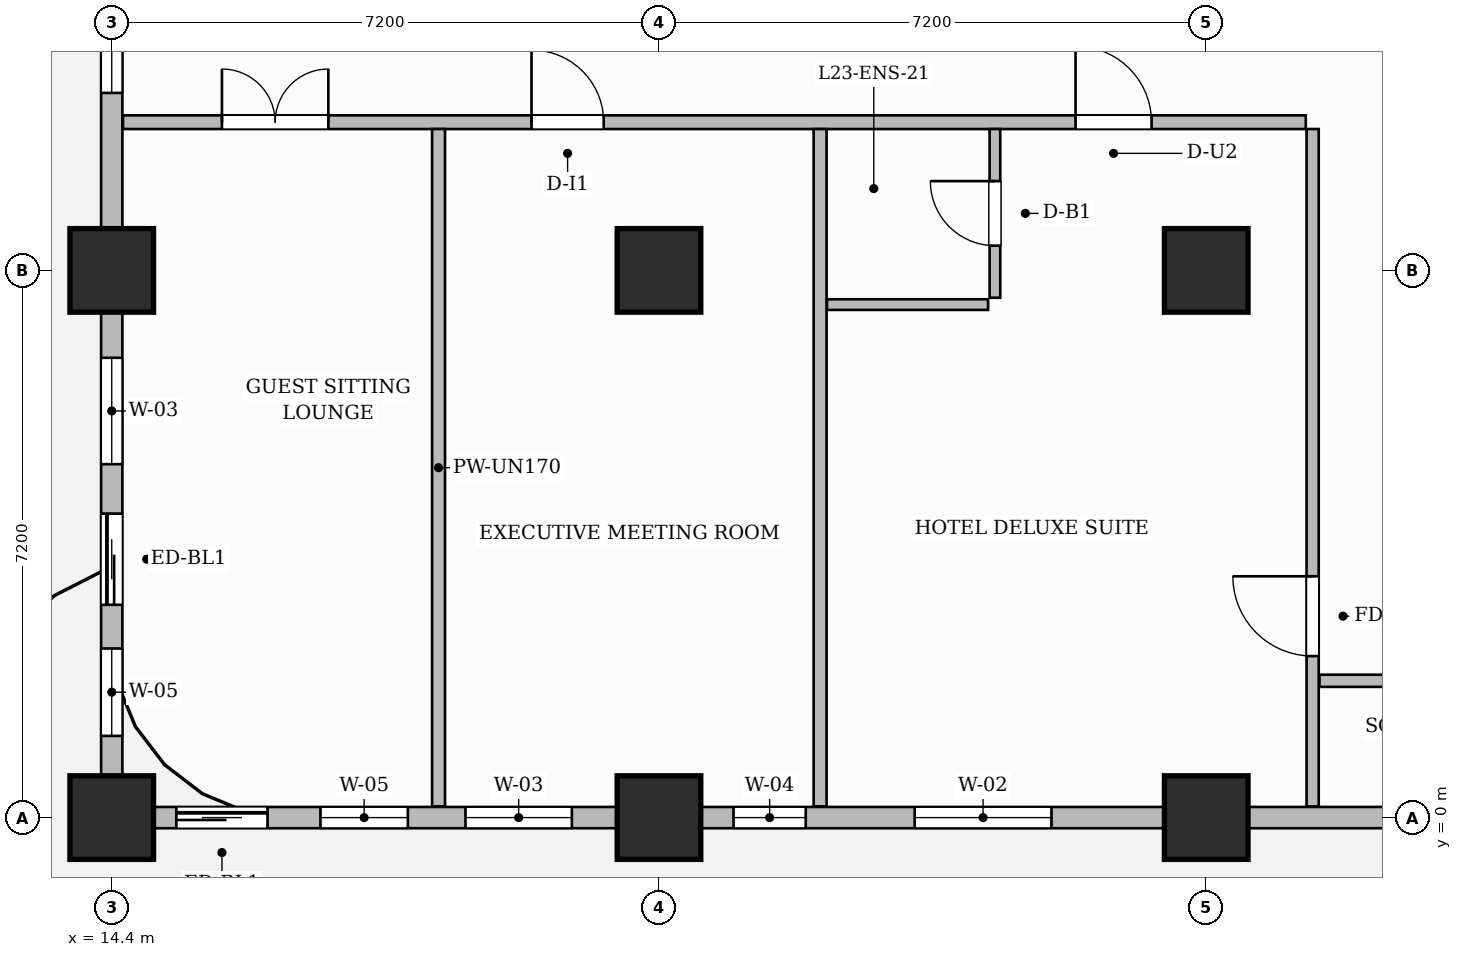
"""IFC4 building model, lengths in metres.
Left out: names, types, materials, properties, quantities, classifications, styles, units other than length and angle.
Written with IfcOpenShell. Run it as: python <this file> out.ifc"""

import sys

from ifc_helpers import new_model, si_unit, direction, frame, frame_2d, origin, origin_2d, place, context, subcontext, project, spatial, rectangle, extrude, source, transform, mapped, element, fill, save


model = new_model("IFC4")
c1 = context("Model", 3, precision=1e-05, world=origin(), true_north=direction((0.0, 1.0)))
c2 = subcontext(c1, "Body", "Model", "MODEL_VIEW")
j1 = project(units=[si_unit("LENGTHUNIT", "METRE"), si_unit("PLANEANGLEUNIT", "RADIAN")], contexts=[c1])
p1 = place(None, origin())
s1 = spatial("IfcSite", under=j1, at=p1, CompositionType="ELEMENT")
p2 = place(p1, origin())
s2 = spatial("IfcBuilding", under=s1, at=p2, CompositionType="ELEMENT")
p3 = place(p2, frame((0.0, 0.0, 95.3)))
s3 = spatial("IfcBuildingStorey", under=s2, at=p3, CompositionType="ELEMENT", Elevation=95.3)
m1 = source(origin(), c2, "Body", "SweptSolid", [
    extrude(rectangle(XDim=1.1, YDim=1.1, at=origin_2d()), origin(), (0.0, 0.0, 1.0), 3.7),
])
for number, where, z_axis, x_axis in (
    (1, (14.4, 0.0, 0.0), (0.0, 0.0, 1.0), (1.0, 0.0, 0.0)),
    (2, (14.4, 7.2, 0.0), (0.0, 0.0, 1.0), (1.0, 0.0, 0.0)),
    (3, (21.6, 0.0, 0.0), (0.0, 0.0, 1.0), (1.0, 0.0, 0.0)),
    (4, (21.6, 7.2, 0.0), (0.0, 0.0, 1.0), (1.0, 0.0, 0.0)),
    (5, (28.8, 0.0, 0.0), (0.0, 0.0, 1.0), (1.0, 0.0, 0.0)),
    (6, (28.8, 7.2, 0.0), (0.0, 0.0, 1.0), (1.0, 0.0, 0.0)),
):
    element("IfcColumn", number, at=place(p3, frame(where, z_axis=z_axis, x_axis=x_axis)), inside=s3, PredefinedType="COLUMN", context=c2, shape_type="MappedRepresentation", body=[
        mapped(m1, transform((0.0, 0.0, 0.0), scale=1.0)),
    ])
p4 = place(p3, frame((14.548, 9.15, 0.0), z_axis=(0.0, 0.0, 1.0), x_axis=(1.0, 0.0, 0.0)))
e7 = element("IfcWall", 7, at=p4, inside=s3, PredefinedType="PARTITIONING", context=c2, shape_type="SweptSolid", body=[
    extrude(rectangle(XDim=15.562, YDim=0.18, at=frame_2d((7.781, 0.0))), origin(), (0.0, 0.0, 1.0), 3.45),
])
p5 = place(p4, frame((1.302, 0.0, 0.0)))
e8 = element("IfcOpeningElement", 8, at=p5, cuts=e7, PredefinedType="OPENING", context=c2, shape_type="SweptSolid", body=[
    extrude(rectangle(XDim=1.4, YDim=2.35, at=frame_2d((0.7, 1.175))), frame((0.0, 0.1, 0.0), z_axis=(0.0, -1.0, 0.0), x_axis=(1.0, 0.0, 0.0)), (0.0, 0.0, 1.0), 0.2),
])
p6 = place(p4, frame((5.375, 0.0, 0.0)))
e9 = element("IfcOpeningElement", 9, at=p6, cuts=e7, PredefinedType="OPENING", context=c2, shape_type="SweptSolid", body=[
    extrude(rectangle(XDim=0.95, YDim=2.15, at=frame_2d((0.475, 1.075))), frame((0.0, 0.1, 0.0), z_axis=(0.0, -1.0, 0.0), x_axis=(1.0, 0.0, 0.0)), (0.0, 0.0, 1.0), 0.2),
])
p7 = place(p4, frame((12.533, 0.0, 0.0)))
e10 = element("IfcOpeningElement", 10, at=p7, cuts=e7, PredefinedType="OPENING", context=c2, shape_type="SweptSolid", body=[
    extrude(rectangle(XDim=1.0, YDim=2.2, at=frame_2d((0.5, 1.1))), frame((0.0, 0.1, 0.0), z_axis=(0.0, -1.0, 0.0), x_axis=(1.0, 0.0, 0.0)), (0.0, 0.0, 1.0), 0.2),
])
p8 = place(p3, frame((30.2, 0.148, 0.0), z_axis=(0.0, 0.0, 1.0), x_axis=(0.0, 1.0, 0.0)))
e11 = element("IfcWall", 11, at=p8, inside=s3, PredefinedType="PARTITIONING", context=c2, shape_type="SweptSolid", body=[
    extrude(rectangle(XDim=8.912, YDim=0.16, at=frame_2d((4.456, 0.0))), origin(), (0.0, 0.0, 1.0), 3.45),
])
p9 = place(p8, frame((1.977, 0.0, 0.0)))
e12 = element("IfcOpeningElement", 12, at=p9, cuts=e11, PredefinedType="OPENING", context=c2, shape_type="SweptSolid", body=[
    extrude(rectangle(XDim=1.05, YDim=2.15, at=frame_2d((0.525, 1.075))), frame((0.0, 0.09, 0.0), z_axis=(0.0, -1.0, 0.0), x_axis=(1.0, 0.0, 0.0)), (0.0, 0.0, 1.0), 0.18),
])
p10 = place(p3, frame((30.29, 1.8, 0.0), z_axis=(0.0, 0.0, 1.0), x_axis=(1.0, 0.0, 0.0)))
e13 = element("IfcWall", 13, at=p10, inside=s3, PredefinedType="PARTITIONING", context=c2, shape_type="SweptSolid", body=[
    extrude(rectangle(XDim=19.37, YDim=0.16, at=frame_2d((9.685, 0.0))), origin(), (0.0, 0.0, 1.0), 3.45),
])
p11 = place(p10, frame((5.213, 0.0, 0.0)))
e14 = element("IfcOpeningElement", 14, at=p11, cuts=e13, PredefinedType="OPENING", context=c2, shape_type="SweptSolid", body=[
    extrude(rectangle(XDim=0.9, YDim=2.15, at=frame_2d((0.45, 1.075))), frame((0.0, 0.09, 0.0), z_axis=(0.0, -1.0, 0.0), x_axis=(1.0, 0.0, 0.0)), (0.0, 0.0, 1.0), 0.18),
])
p12 = place(p10, frame((14.06, 0.0, 0.0)))
e15 = element("IfcOpeningElement", 15, at=p12, cuts=e13, PredefinedType="OPENING", context=c2, shape_type="SweptSolid", body=[
    extrude(rectangle(XDim=0.9, YDim=2.15, at=frame_2d((0.45, 1.075))), frame((0.0, 0.09, 0.0), z_axis=(0.0, -1.0, 0.0), x_axis=(1.0, 0.0, 0.0)), (0.0, 0.0, 1.0), 0.18),
])
for number, where, z_axis, x_axis in (
    (16, (18.7, 0.148, 0.0), (0.0, 0.0, 1.0), (0.0, 1.0, 0.0)),
    (17, (23.72, 0.148, 0.0), (0.0, 0.0, 1.0), (0.0, 1.0, 0.0)),
):
    element("IfcWall", number, at=place(p3, frame(where, z_axis=z_axis, x_axis=x_axis)), inside=s3, PredefinedType="PARTITIONING", context=c2, shape_type="SweptSolid", body=[
        extrude(rectangle(XDim=8.912, YDim=0.17, at=frame_2d((4.456, 0.0))), origin(), (0.0, 0.0, 1.0), 3.45),
    ])
p13 = place(p3, frame((26.02, 6.84, 0.0), z_axis=(0.0, 0.0, 1.0), x_axis=(0.0, 1.0, 0.0)))
e18 = element("IfcWall", 18, at=p13, inside=s3, PredefinedType="PARTITIONING", context=c2, shape_type="SweptSolid", body=[
    extrude(rectangle(XDim=2.22, YDim=0.14, at=frame_2d((1.11, 0.0))), origin(), (0.0, 0.0, 1.0), 3.45),
])
p14 = place(p13, frame((0.685, 0.0, 0.0)))
e19 = element("IfcOpeningElement", 19, at=p14, cuts=e18, PredefinedType="OPENING", context=c2, shape_type="SweptSolid", body=[
    extrude(rectangle(XDim=0.85, YDim=2.1, at=frame_2d((0.425, 1.05))), frame((0.0, 0.08, 0.0), z_axis=(0.0, -1.0, 0.0), x_axis=(1.0, 0.0, 0.0)), (0.0, 0.0, 1.0), 0.16),
])
p15 = place(p3, frame((23.81, 6.75, 0.0), z_axis=(0.0, 0.0, 1.0), x_axis=(1.0, 0.0, 0.0)))
e20 = element("IfcWall", 20, at=p15, inside=s3, PredefinedType="PARTITIONING", context=c2, shape_type="SweptSolid", body=[
    extrude(rectangle(XDim=2.12, YDim=0.14, at=frame_2d((1.06, 0.0))), origin(), (0.0, 0.0, 1.0), 3.45),
])
p16 = place(p3, frame((14.4, 0.0, 0.0), z_axis=(0.0, 0.0, 1.0), x_axis=(1.0, 0.0, 0.0)))
e21 = element("IfcWall", 21, at=p16, inside=s3, PredefinedType="SOLIDWALL", context=c2, shape_type="SweptSolid", body=[
    extrude(rectangle(XDim=43.2, YDim=0.28, at=frame_2d((21.6, 0.0))), origin(), (0.0, 0.0, 1.0), 2.885),
])
p17 = place(p16, frame((0.85, 0.0, 0.0)))
e22 = element("IfcOpeningElement", 22, at=p17, cuts=e21, PredefinedType="OPENING", context=c2, shape_type="SweptSolid", body=[
    extrude(rectangle(XDim=1.2, YDim=2.2, at=frame_2d((0.6, 1.1))), frame((0.0, 0.15, 0.0), z_axis=(0.0, -1.0, 0.0), x_axis=(1.0, 0.0, 0.0)), (0.0, 0.0, 1.0), 0.3),
])
p18 = place(p16, frame((2.746, 0.0, 0.8)))
e23 = element("IfcOpeningElement", 23, at=p18, cuts=e21, PredefinedType="OPENING", context=c2, shape_type="SweptSolid", body=[
    extrude(rectangle(XDim=1.15, YDim=1.8, at=frame_2d((0.575, 0.9))), frame((0.0, 0.15, 0.0), z_axis=(0.0, -1.0, 0.0), x_axis=(1.0, 0.0, 0.0)), (0.0, 0.0, 1.0), 0.3),
])
p19 = place(p16, frame((4.654, 0.0, 0.8)))
e24 = element("IfcOpeningElement", 24, at=p19, cuts=e21, PredefinedType="OPENING", context=c2, shape_type="SweptSolid", body=[
    extrude(rectangle(XDim=1.4, YDim=1.85, at=frame_2d((0.7, 0.925))), frame((0.0, 0.15, 0.0), z_axis=(0.0, -1.0, 0.0), x_axis=(1.0, 0.0, 0.0)), (0.0, 0.0, 1.0), 0.3),
])
p20 = place(p16, frame((8.181, 0.0, 0.8)))
e25 = element("IfcOpeningElement", 25, at=p20, cuts=e21, PredefinedType="OPENING", context=c2, shape_type="SweptSolid", body=[
    extrude(rectangle(XDim=0.95, YDim=1.75, at=frame_2d((0.475, 0.875))), frame((0.0, 0.15, 0.0), z_axis=(0.0, -1.0, 0.0), x_axis=(1.0, 0.0, 0.0)), (0.0, 0.0, 1.0), 0.3),
])
p21 = place(p16, frame((10.564, 0.0, 0.8)))
e26 = element("IfcOpeningElement", 26, at=p21, cuts=e21, PredefinedType="OPENING", context=c2, shape_type="SweptSolid", body=[
    extrude(rectangle(XDim=1.8, YDim=1.85, at=frame_2d((0.9, 0.925))), frame((0.0, 0.15, 0.0), z_axis=(0.0, -1.0, 0.0), x_axis=(1.0, 0.0, 0.0)), (0.0, 0.0, 1.0), 0.3),
])
p22 = place(p16, frame((16.804, 0.0, 0.8)))
e27 = element("IfcOpeningElement", 27, at=p22, cuts=e21, PredefinedType="OPENING", context=c2, shape_type="SweptSolid", body=[
    extrude(rectangle(XDim=1.8, YDim=1.85, at=frame_2d((0.9, 0.925))), frame((0.0, 0.15, 0.0), z_axis=(0.0, -1.0, 0.0), x_axis=(1.0, 0.0, 0.0)), (0.0, 0.0, 1.0), 0.3),
])
p23 = place(p16, frame((22.396, 0.0, 0.8)))
e28 = element("IfcOpeningElement", 28, at=p23, cuts=e21, PredefinedType="OPENING", context=c2, shape_type="SweptSolid", body=[
    extrude(rectangle(XDim=1.8, YDim=1.85, at=frame_2d((0.9, 0.925))), frame((0.0, 0.15, 0.0), z_axis=(0.0, -1.0, 0.0), x_axis=(1.0, 0.0, 0.0)), (0.0, 0.0, 1.0), 0.3),
])
p24 = place(p16, frame((25.629, 0.0, 0.8)))
e29 = element("IfcOpeningElement", 29, at=p24, cuts=e21, PredefinedType="OPENING", context=c2, shape_type="SweptSolid", body=[
    extrude(rectangle(XDim=0.95, YDim=1.75, at=frame_2d((0.475, 0.875))), frame((0.0, 0.15, 0.0), z_axis=(0.0, -1.0, 0.0), x_axis=(1.0, 0.0, 0.0)), (0.0, 0.0, 1.0), 0.3),
])
p25 = place(p16, frame((29.075, 0.0, 0.8)))
e30 = element("IfcOpeningElement", 30, at=p25, cuts=e21, PredefinedType="OPENING", context=c2, shape_type="SweptSolid", body=[
    extrude(rectangle(XDim=1.8, YDim=1.85, at=frame_2d((0.9, 0.925))), frame((0.0, 0.15, 0.0), z_axis=(0.0, -1.0, 0.0), x_axis=(1.0, 0.0, 0.0)), (0.0, 0.0, 1.0), 0.3),
])
p26 = place(p16, frame((32.125, 0.0, 0.8)))
e31 = element("IfcOpeningElement", 31, at=p26, cuts=e21, PredefinedType="OPENING", context=c2, shape_type="SweptSolid", body=[
    extrude(rectangle(XDim=1.8, YDim=1.85, at=frame_2d((0.9, 0.925))), frame((0.0, 0.15, 0.0), z_axis=(0.0, -1.0, 0.0), x_axis=(1.0, 0.0, 0.0)), (0.0, 0.0, 1.0), 0.3),
])
p27 = place(p16, frame((36.946, 0.0, 0.8)))
e32 = element("IfcOpeningElement", 32, at=p27, cuts=e21, PredefinedType="OPENING", context=c2, shape_type="SweptSolid", body=[
    extrude(rectangle(XDim=1.8, YDim=1.85, at=frame_2d((0.9, 0.925))), frame((0.0, 0.15, 0.0), z_axis=(0.0, -1.0, 0.0), x_axis=(1.0, 0.0, 0.0)), (0.0, 0.0, 1.0), 0.3),
])
p28 = place(p16, frame((40.054, 0.0, 0.8)))
e33 = element("IfcOpeningElement", 33, at=p28, cuts=e21, PredefinedType="OPENING", context=c2, shape_type="SweptSolid", body=[
    extrude(rectangle(XDim=1.8, YDim=1.85, at=frame_2d((0.9, 0.925))), frame((0.0, 0.15, 0.0), z_axis=(0.0, -1.0, 0.0), x_axis=(1.0, 0.0, 0.0)), (0.0, 0.0, 1.0), 0.3),
])
p29 = place(p3, frame((14.4, 0.05, 0.0), z_axis=(0.0, 0.0, 1.0), x_axis=(0.0, 1.0, 0.0)))
e34 = element("IfcWall", 34, at=p29, inside=s3, PredefinedType="SOLIDWALL", context=c2, shape_type="SweptSolid", body=[
    extrude(rectangle(XDim=20.6, YDim=0.28, at=frame_2d((10.3, 0.0))), origin(), (0.0, 0.0, 1.0), 2.885),
])
p30 = place(p29, frame((2.75, 0.0, 0.0)))
e35 = element("IfcOpeningElement", 35, at=p30, cuts=e34, PredefinedType="OPENING", context=c2, shape_type="SweptSolid", body=[
    extrude(rectangle(XDim=1.2, YDim=2.2, at=frame_2d((0.6, 1.1))), frame((0.0, 0.15, 0.0), z_axis=(0.0, -1.0, 0.0), x_axis=(1.0, 0.0, 0.0)), (0.0, 0.0, 1.0), 0.3),
])
p31 = place(p29, frame((1.025, 0.0, 0.8)))
e36 = element("IfcOpeningElement", 36, at=p31, cuts=e34, PredefinedType="OPENING", context=c2, shape_type="SweptSolid", body=[
    extrude(rectangle(XDim=1.15, YDim=1.8, at=frame_2d((0.575, 0.9))), frame((0.0, 0.15, 0.0), z_axis=(0.0, -1.0, 0.0), x_axis=(1.0, 0.0, 0.0)), (0.0, 0.0, 1.0), 0.3),
])
p32 = place(p29, frame((4.6, 0.0, 0.8)))
e37 = element("IfcOpeningElement", 37, at=p32, cuts=e34, PredefinedType="OPENING", context=c2, shape_type="SweptSolid", body=[
    extrude(rectangle(XDim=1.4, YDim=1.85, at=frame_2d((0.7, 0.925))), frame((0.0, 0.15, 0.0), z_axis=(0.0, -1.0, 0.0), x_axis=(1.0, 0.0, 0.0)), (0.0, 0.0, 1.0), 0.3),
])
p33 = place(p29, frame((9.485, 0.0, 0.8)))
e38 = element("IfcOpeningElement", 38, at=p33, cuts=e34, PredefinedType="OPENING", context=c2, shape_type="SweptSolid", body=[
    extrude(rectangle(XDim=1.15, YDim=1.8, at=frame_2d((0.575, 0.9))), frame((0.0, 0.15, 0.0), z_axis=(0.0, -1.0, 0.0), x_axis=(1.0, 0.0, 0.0)), (0.0, 0.0, 1.0), 0.3),
])
p34 = place(p29, frame((11.389, 0.0, 0.8)))
e39 = element("IfcOpeningElement", 39, at=p34, cuts=e34, PredefinedType="OPENING", context=c2, shape_type="SweptSolid", body=[
    extrude(rectangle(XDim=1.8, YDim=1.85, at=frame_2d((0.9, 0.925))), frame((0.0, 0.15, 0.0), z_axis=(0.0, -1.0, 0.0), x_axis=(1.0, 0.0, 0.0)), (0.0, 0.0, 1.0), 0.3),
])
p35 = place(p29, frame((16.79, 0.0, 0.8)))
e40 = element("IfcOpeningElement", 40, at=p35, cuts=e34, PredefinedType="OPENING", context=c2, shape_type="SweptSolid", body=[
    extrude(rectangle(XDim=1.8, YDim=1.85, at=frame_2d((0.9, 0.925))), frame((0.0, 0.15, 0.0), z_axis=(0.0, -1.0, 0.0), x_axis=(1.0, 0.0, 0.0)), (0.0, 0.0, 1.0), 0.3),
])
m2 = source(origin(), c2, "Body", "SweptSolid", [
    extrude(rectangle(XDim=1.05, YDim=2.15, at=frame_2d((0.525, 1.075))), frame((0.0, 0.025, 0.0), z_axis=(0.0, -1.0, 0.0), x_axis=(1.0, 0.0, 0.0)), (0.0, 0.0, 1.0), 0.05),
])
p36 = place(p9, origin())
e41 = element("IfcDoor", 41, at=p36, inside=s3, OperationType="SINGLE_SWING_RIGHT", PredefinedType="DOOR", context=c2, shape_type="MappedRepresentation", body=[
    mapped(m2, transform((0.0, 0.0, 0.0), scale=1.0)),
])
fill(e12, e41)
m3 = source(origin(), c2, "Body", "SweptSolid", [
    extrude(rectangle(XDim=1.4, YDim=2.35, at=frame_2d((0.7, 1.175))), frame((0.0, 0.025, 0.0), z_axis=(0.0, -1.0, 0.0), x_axis=(1.0, 0.0, 0.0)), (0.0, 0.0, 1.0), 0.05),
])
p37 = place(p5, origin())
e42 = element("IfcDoor", 42, at=p37, inside=s3, OperationType="DOUBLE_DOOR_SINGLE_SWING", PredefinedType="DOOR", context=c2, shape_type="MappedRepresentation", body=[
    mapped(m3, transform((0.0, 0.0, 0.0), scale=1.0)),
])
fill(e8, e42)
m4 = source(origin(), c2, "Body", "SweptSolid", [
    extrude(rectangle(XDim=0.95, YDim=2.15, at=frame_2d((0.475, 1.075))), frame((0.0, 0.025, 0.0), z_axis=(0.0, -1.0, 0.0), x_axis=(1.0, 0.0, 0.0)), (0.0, 0.0, 1.0), 0.05),
])
p38 = place(p6, origin())
e43 = element("IfcDoor", 43, at=p38, inside=s3, OperationType="SINGLE_SWING_LEFT", PredefinedType="DOOR", context=c2, shape_type="MappedRepresentation", body=[
    mapped(m4, transform((0.0, 0.0, 0.0), scale=1.0)),
])
fill(e9, e43)
m5 = source(origin(), c2, "Body", "SweptSolid", [
    extrude(rectangle(XDim=0.85, YDim=2.1, at=frame_2d((0.425, 1.05))), frame((0.0, 0.025, 0.0), z_axis=(0.0, -1.0, 0.0), x_axis=(1.0, 0.0, 0.0)), (0.0, 0.0, 1.0), 0.05),
])
p39 = place(p14, origin())
e44 = element("IfcDoor", 44, at=p39, inside=s3, OperationType="SINGLE_SWING_RIGHT", PredefinedType="DOOR", context=c2, shape_type="MappedRepresentation", body=[
    mapped(m5, transform((0.0, 0.0, 0.0), scale=1.0)),
])
fill(e19, e44)
m6 = source(origin(), c2, "Body", "SweptSolid", [
    extrude(rectangle(XDim=1.0, YDim=2.2, at=frame_2d((0.5, 1.1))), frame((0.0, 0.025, 0.0), z_axis=(0.0, -1.0, 0.0), x_axis=(1.0, 0.0, 0.0)), (0.0, 0.0, 1.0), 0.05),
])
p40 = place(p7, origin())
e45 = element("IfcDoor", 45, at=p40, inside=s3, OperationType="SINGLE_SWING_LEFT", PredefinedType="DOOR", context=c2, shape_type="MappedRepresentation", body=[
    mapped(m6, transform((0.0, 0.0, 0.0), scale=1.0)),
])
fill(e10, e45)
m7 = source(origin(), c2, "Body", "SweptSolid", [
    extrude(rectangle(XDim=1.2, YDim=2.2, at=frame_2d((0.6, 1.1))), frame((0.0, 0.025, 0.0), z_axis=(0.0, -1.0, 0.0), x_axis=(1.0, 0.0, 0.0)), (0.0, 0.0, 1.0), 0.05),
])
p41 = place(p17, origin())
e46 = element("IfcDoor", 46, at=p41, inside=s3, OperationType="SLIDING_TO_LEFT", PredefinedType="DOOR", context=c2, shape_type="MappedRepresentation", body=[
    mapped(m7, transform((0.0, 0.0, 0.0), scale=1.0)),
])
fill(e22, e46)
p42 = place(p30, origin())
e47 = element("IfcDoor", 47, at=p42, inside=s3, OperationType="SLIDING_TO_LEFT", PredefinedType="DOOR", context=c2, shape_type="MappedRepresentation", body=[
    mapped(m7, transform((0.0, 0.0, 0.0), scale=1.0)),
])
fill(e35, e47)
m8 = source(origin(), c2, "Body", "SweptSolid", [
    extrude(rectangle(XDim=1.15, YDim=1.8, at=frame_2d((0.575, 0.9))), frame((0.0, 0.03, 0.0), z_axis=(0.0, -1.0, 0.0), x_axis=(1.0, 0.0, 0.0)), (0.0, 0.0, 1.0), 0.06),
])
p43 = place(p18, origin())
e48 = element("IfcWindow", 48, at=p43, inside=s3, PartitioningType="SINGLE_PANEL", PredefinedType="WINDOW", context=c2, shape_type="MappedRepresentation", body=[
    mapped(m8, transform((0.0, 0.0, 0.0), scale=1.0)),
])
fill(e23, e48)
m9 = source(origin(), c2, "Body", "SweptSolid", [
    extrude(rectangle(XDim=1.4, YDim=1.85, at=frame_2d((0.7, 0.925))), frame((0.0, 0.03, 0.0), z_axis=(0.0, -1.0, 0.0), x_axis=(1.0, 0.0, 0.0)), (0.0, 0.0, 1.0), 0.06),
])
p44 = place(p19, origin())
e49 = element("IfcWindow", 49, at=p44, inside=s3, PartitioningType="SINGLE_PANEL", PredefinedType="WINDOW", context=c2, shape_type="MappedRepresentation", body=[
    mapped(m9, transform((0.0, 0.0, 0.0), scale=1.0)),
])
fill(e24, e49)
m10 = source(origin(), c2, "Body", "SweptSolid", [
    extrude(rectangle(XDim=0.95, YDim=1.75, at=frame_2d((0.475, 0.875))), frame((0.0, 0.03, 0.0), z_axis=(0.0, -1.0, 0.0), x_axis=(1.0, 0.0, 0.0)), (0.0, 0.0, 1.0), 0.06),
])
p45 = place(p20, origin())
e50 = element("IfcWindow", 50, at=p45, inside=s3, PartitioningType="SINGLE_PANEL", PredefinedType="WINDOW", context=c2, shape_type="MappedRepresentation", body=[
    mapped(m10, transform((0.0, 0.0, 0.0), scale=1.0)),
])
fill(e25, e50)
m11 = source(origin(), c2, "Body", "SweptSolid", [
    extrude(rectangle(XDim=1.8, YDim=1.85, at=frame_2d((0.9, 0.925))), frame((0.0, 0.03, 0.0), z_axis=(0.0, -1.0, 0.0), x_axis=(1.0, 0.0, 0.0)), (0.0, 0.0, 1.0), 0.06),
])
p46 = place(p21, origin())
e51 = element("IfcWindow", 51, at=p46, inside=s3, PartitioningType="DOUBLE_PANEL_VERTICAL", PredefinedType="WINDOW", context=c2, shape_type="MappedRepresentation", body=[
    mapped(m11, transform((0.0, 0.0, 0.0), scale=1.0)),
])
fill(e26, e51)
p47 = place(p31, origin())
e52 = element("IfcWindow", 52, at=p47, inside=s3, PartitioningType="SINGLE_PANEL", PredefinedType="WINDOW", context=c2, shape_type="MappedRepresentation", body=[
    mapped(m8, transform((0.0, 0.0, 0.0), scale=1.0)),
])
fill(e36, e52)
p48 = place(p32, origin())
e53 = element("IfcWindow", 53, at=p48, inside=s3, PartitioningType="SINGLE_PANEL", PredefinedType="WINDOW", context=c2, shape_type="MappedRepresentation", body=[
    mapped(m9, transform((0.0, 0.0, 0.0), scale=1.0)),
])
fill(e37, e53)
p49 = place(p33, origin())
e54 = element("IfcWindow", 54, at=p49, inside=s3, PartitioningType="SINGLE_PANEL", PredefinedType="WINDOW", context=c2, shape_type="MappedRepresentation", body=[
    mapped(m8, transform((0.0, 0.0, 0.0), scale=1.0)),
])
fill(e38, e54)
save(model, sys.argv[1])
